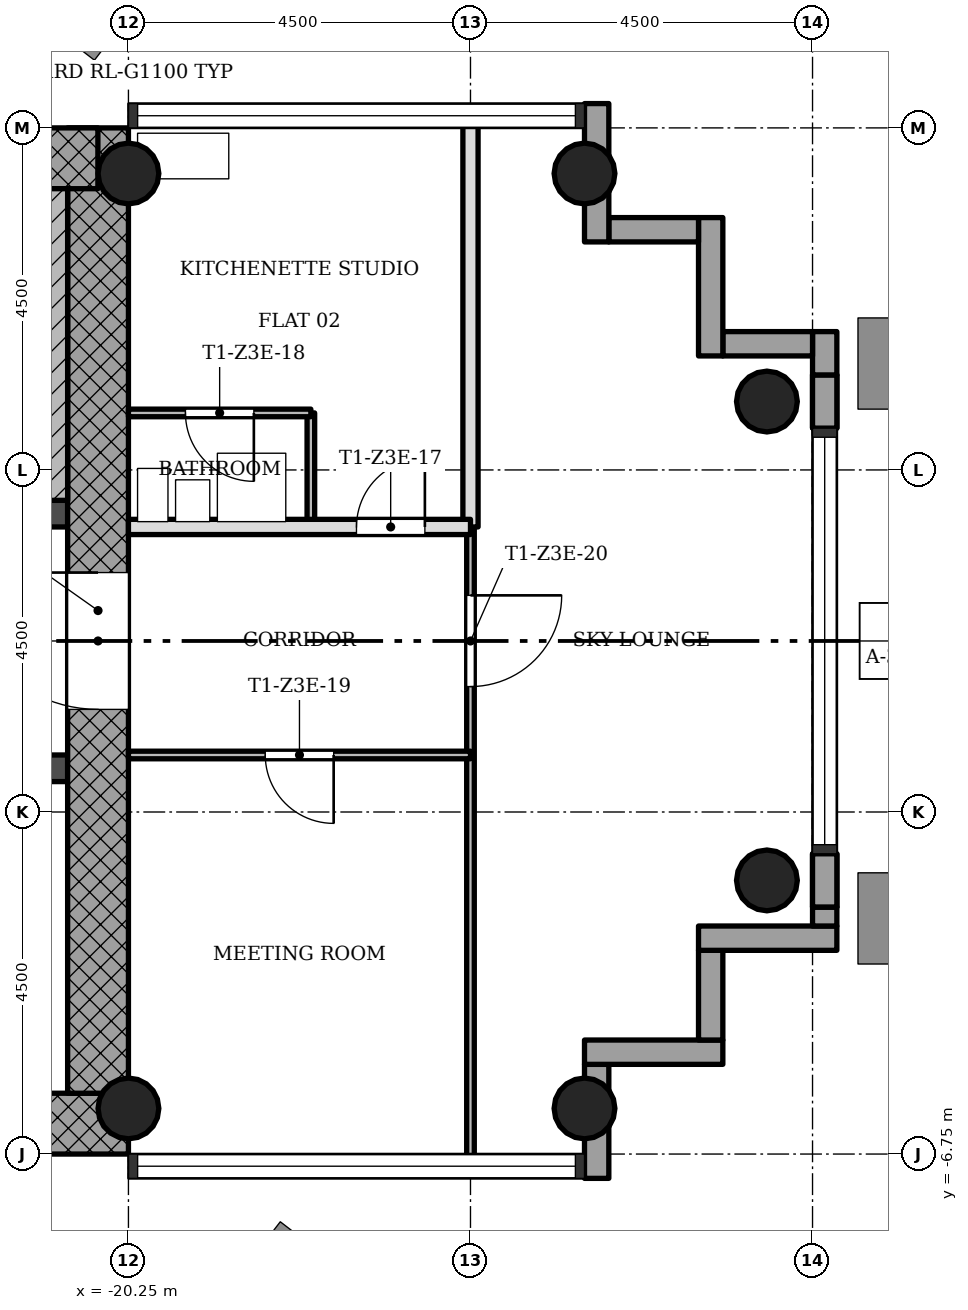
"""IFC4 building model, lengths in metres.
Left out: names, types, materials, properties, quantities, classifications, styles, units other than length and angle.
Written with IfcOpenShell. Run it as: python <this file> out.ifc"""

import sys

from ifc_helpers import new_model, si_unit, direction, frame, frame_2d, origin, origin_2d, place, context, subcontext, project, spatial, rectangle, hollow_circle, extrude, element, fill, save


model = new_model("IFC4")
c1 = context("Model", 3, precision=1e-05, world=origin(), true_north=direction((0.0, 1.0)))
c2 = subcontext(c1, "Body", "Model", "MODEL_VIEW")
j1 = project(units=[si_unit("LENGTHUNIT", "METRE"), si_unit("PLANEANGLEUNIT", "RADIAN")], contexts=[c1])
p1 = place(None, origin())
s1 = spatial("IfcSite", under=j1, at=p1, CompositionType="ELEMENT")
p2 = place(p1, origin())
s2 = spatial("IfcBuilding", under=s1, at=p2, CompositionType="ELEMENT")
p3 = place(p2, frame((0.0, 0.0, 177.9)))
s3 = spatial("IfcBuildingStorey", under=s2, at=p3, CompositionType="ELEMENT", Elevation=177.9)
p4 = place(p3, frame((-28.45, -6.35, 0.0), z_axis=(0.0, 0.0, 1.0), x_axis=(1.0, 0.0, 0.0)))
e1 = element("IfcWall", 1, at=p4, inside=s3, PredefinedType="SHEAR", context=c2, shape_type="SweptSolid", body=[
    extrude(rectangle(XDim=8.2, YDim=0.8, at=frame_2d((4.1, 0.0))), origin(), (0.0, 0.0, 1.0), 3.4),
])
p5 = place(p3, frame((-20.65, -5.95, 0.0), z_axis=(0.0, 0.0, 1.0), x_axis=(0.0, 1.0, 0.0)))
e2 = element("IfcWall", 2, at=p5, inside=s3, PredefinedType="SHEAR", context=c2, shape_type="SweptSolid", body=[
    extrude(rectangle(XDim=12.7, YDim=0.8, at=frame_2d((6.35, 0.0))), origin(), (0.0, 0.0, 1.0), 3.4),
])
p6 = place(p5, frame((5.05, 0.0, 0.0)))
e3 = element("IfcOpeningElement", 3, at=p6, cuts=e2, PredefinedType="OPENING", context=c2, shape_type="SweptSolid", body=[
    extrude(rectangle(XDim=1.8, YDim=2.1, at=frame_2d((0.9, 1.05))), frame((0.0, 0.41, 0.0), z_axis=(0.0, -1.0, 0.0), x_axis=(1.0, 0.0, 0.0)), (0.0, 0.0, 1.0), 0.82),
])
p7 = place(p3, frame((-20.652, 6.35, 0.0), z_axis=(0.0, 0.0, 1.0), x_axis=(-1.0, 0.0, 0.0)))
e4 = element("IfcWall", 4, at=p7, inside=s3, PredefinedType="SHEAR", context=c2, shape_type="SweptSolid", body=[
    extrude(rectangle(XDim=8.796, YDim=0.8, at=frame_2d((4.398, 0.0))), origin(), (0.0, 0.0, 1.0), 3.4),
])
p8 = place(p3, frame((-28.45, -1.675, 0.0), z_axis=(0.0, 0.0, 1.0), x_axis=(1.0, 0.0, 0.0)))
e5 = element("IfcWall", 5, at=p8, inside=s3, PredefinedType="SHEAR", context=c2, shape_type="SweptSolid", body=[
    extrude(rectangle(XDim=7.4, YDim=0.35, at=frame_2d((3.7, 0.0))), origin(), (0.0, 0.0, 1.0), 3.4),
])
p9 = place(p8, frame((0.95, 0.0, 0.0)))
e6 = element("IfcOpeningElement", 6, at=p9, cuts=e5, PredefinedType="OPENING", context=c2, shape_type="SweptSolid", body=[
    extrude(rectangle(XDim=1.1, YDim=2.1, at=frame_2d((0.55, 1.05))), frame((0.0, 0.185, 0.0), z_axis=(0.0, -1.0, 0.0), x_axis=(1.0, 0.0, 0.0)), (0.0, 0.0, 1.0), 0.37),
])
p10 = place(p8, frame((3.15, 0.0, 0.0)))
e7 = element("IfcOpeningElement", 7, at=p10, cuts=e5, PredefinedType="OPENING", context=c2, shape_type="SweptSolid", body=[
    extrude(rectangle(XDim=1.1, YDim=2.1, at=frame_2d((0.55, 1.05))), frame((0.0, 0.185, 0.0), z_axis=(0.0, -1.0, 0.0), x_axis=(1.0, 0.0, 0.0)), (0.0, 0.0, 1.0), 0.37),
])
p11 = place(p8, frame((5.35, 0.0, 0.0)))
e8 = element("IfcOpeningElement", 8, at=p11, cuts=e5, PredefinedType="OPENING", context=c2, shape_type="SweptSolid", body=[
    extrude(rectangle(XDim=1.1, YDim=2.1, at=frame_2d((0.55, 1.05))), frame((0.0, 0.185, 0.0), z_axis=(0.0, -1.0, 0.0), x_axis=(1.0, 0.0, 0.0)), (0.0, 0.0, 1.0), 0.37),
])
p12 = place(p3, frame((-28.45, 1.675, 0.0), z_axis=(0.0, 0.0, 1.0), x_axis=(1.0, 0.0, 0.0)))
e9 = element("IfcWall", 9, at=p12, inside=s3, PredefinedType="SHEAR", context=c2, shape_type="SweptSolid", body=[
    extrude(rectangle(XDim=7.4, YDim=0.35, at=frame_2d((3.7, 0.0))), origin(), (0.0, 0.0, 1.0), 3.4),
])
p13 = place(p12, frame((0.85, 0.0, 0.0)))
e10 = element("IfcOpeningElement", 10, at=p13, cuts=e9, PredefinedType="OPENING", context=c2, shape_type="SweptSolid", body=[
    extrude(rectangle(XDim=0.9, YDim=2.1, at=frame_2d((0.45, 1.05))), frame((0.0, 0.185, 0.0), z_axis=(0.0, -1.0, 0.0), x_axis=(1.0, 0.0, 0.0)), (0.0, 0.0, 1.0), 0.37),
])
for number, where, z_axis, x_axis in (
    (11, (-20.25, -6.15, 0.0), (0.0, 0.0, 1.0), (1.0, 0.0, 0.0)),
    (12, (-20.25, 6.15, 0.0), (0.0, 0.0, 1.0), (1.0, 0.0, 0.0)),
    (13, (-14.25, -6.15, 0.0), (0.0, 0.0, 1.0), (1.0, 0.0, 0.0)),
    (14, (-14.25, 6.15, 0.0), (0.0, 0.0, 1.0), (1.0, 0.0, 0.0)),
    (15, (-11.85, -3.15, 0.0), (0.0, 0.0, 1.0), (1.0, 0.0, 0.0)),
    (16, (-11.85, 3.15, 0.0), (0.0, 0.0, 1.0), (1.0, 0.0, 0.0)),
):
    element("IfcColumn", number, at=place(p3, frame(where, z_axis=z_axis, x_axis=x_axis)), inside=s3, PredefinedType="COLUMN", context=c2, shape_type="SweptSolid", body=[
        extrude(hollow_circle(Radius=0.4, WallThickness=0.028, at=origin_2d()), origin(), (0.0, 0.0, 1.0), 3.4),
    ])
p14 = place(p3, frame((-14.09, -7.07, -0.3), z_axis=(0.0, 0.0, 1.0), x_axis=(0.0, 1.0, 0.0)))
e17 = element("IfcWall", 17, at=p14, inside=s3, PredefinedType="STANDARD", context=c2, shape_type="SweptSolid", body=[
    extrude(rectangle(XDim=1.5, YDim=0.32, at=frame_2d((0.75, 0.0))), origin(), (0.0, 0.0, 1.0), 3.4),
])
p15 = place(p3, frame((-14.25, -5.41, -0.3), z_axis=(0.0, 0.0, 1.0), x_axis=(1.0, 0.0, 0.0)))
e18 = element("IfcWall", 18, at=p15, inside=s3, PredefinedType="STANDARD", context=c2, shape_type="SweptSolid", body=[
    extrude(rectangle(XDim=1.82, YDim=0.32, at=frame_2d((0.91, 0.0))), origin(), (0.0, 0.0, 1.0), 3.4),
])
p16 = place(p3, frame((-12.59, -5.25, -0.3), z_axis=(0.0, 0.0, 1.0), x_axis=(0.0, 1.0, 0.0)))
e19 = element("IfcWall", 19, at=p16, inside=s3, PredefinedType="STANDARD", context=c2, shape_type="SweptSolid", body=[
    extrude(rectangle(XDim=1.18, YDim=0.32, at=frame_2d((0.59, 0.0))), origin(), (0.0, 0.0, 1.0), 3.4),
])
p17 = place(p3, frame((-12.75, -3.91, -0.3), z_axis=(0.0, 0.0, 1.0), x_axis=(1.0, 0.0, 0.0)))
e20 = element("IfcWall", 20, at=p17, inside=s3, PredefinedType="STANDARD", context=c2, shape_type="SweptSolid", body=[
    extrude(rectangle(XDim=1.82, YDim=0.32, at=frame_2d((0.91, 0.0))), origin(), (0.0, 0.0, 1.0), 3.4),
])
p18 = place(p3, frame((-11.09, -3.75, 0.0), z_axis=(0.0, 0.0, 1.0), x_axis=(0.0, 1.0, 0.0)))
e21 = element("IfcWall", 21, at=p18, inside=s3, PredefinedType="STANDARD", context=c2, shape_type="SweptSolid", body=[
    extrude(rectangle(XDim=0.25, YDim=0.32, at=frame_2d((0.125, 0.0))), origin(), (0.0, 0.0, 1.0), 3.1),
])
p19 = place(p3, frame((-11.09, -3.5, 0.0), z_axis=(0.0, 0.0, 1.0), x_axis=(0.0, 1.0, 0.0)))
e22 = element("IfcWall", 22, at=p19, inside=s3, PredefinedType="STANDARD", context=c2, shape_type="SweptSolid", body=[
    extrude(rectangle(XDim=0.7, YDim=0.32, at=frame_2d((0.35, 0.0))), origin(), (0.0, 0.0, 1.0), 2.51),
])
p20 = place(p3, frame((-11.09, -3.5, 2.98), z_axis=(0.0, 0.0, 1.0), x_axis=(0.0, 1.0, 0.0)))
e23 = element("IfcWall", 23, at=p20, inside=s3, PredefinedType="STANDARD", context=c2, shape_type="SweptSolid", body=[
    extrude(rectangle(XDim=0.7, YDim=0.32, at=frame_2d((0.35, 0.0))), origin(), (0.0, 0.0, 1.0), 0.12),
])
p21 = place(p3, frame((-11.09, 2.8, 0.0), z_axis=(0.0, 0.0, 1.0), x_axis=(0.0, 1.0, 0.0)))
e24 = element("IfcWall", 24, at=p21, inside=s3, PredefinedType="STANDARD", context=c2, shape_type="SweptSolid", body=[
    extrude(rectangle(XDim=0.7, YDim=0.32, at=frame_2d((0.35, 0.0))), origin(), (0.0, 0.0, 1.0), 2.51),
])
p22 = place(p3, frame((-11.09, 2.8, 2.98), z_axis=(0.0, 0.0, 1.0), x_axis=(0.0, 1.0, 0.0)))
e25 = element("IfcWall", 25, at=p22, inside=s3, PredefinedType="STANDARD", context=c2, shape_type="SweptSolid", body=[
    extrude(rectangle(XDim=0.7, YDim=0.32, at=frame_2d((0.35, 0.0))), origin(), (0.0, 0.0, 1.0), 0.12),
])
p23 = place(p3, frame((-11.09, 3.5, 0.0), z_axis=(0.0, 0.0, 1.0), x_axis=(0.0, 1.0, 0.0)))
e26 = element("IfcWall", 26, at=p23, inside=s3, PredefinedType="STANDARD", context=c2, shape_type="SweptSolid", body=[
    extrude(rectangle(XDim=0.57, YDim=0.32, at=frame_2d((0.285, 0.0))), origin(), (0.0, 0.0, 1.0), 3.1),
])
p24 = place(p3, frame((-11.25, 3.91, -0.3), z_axis=(0.0, 0.0, 1.0), x_axis=(-1.0, 0.0, 0.0)))
e27 = element("IfcWall", 27, at=p24, inside=s3, PredefinedType="STANDARD", context=c2, shape_type="SweptSolid", body=[
    extrude(rectangle(XDim=1.18, YDim=0.32, at=frame_2d((0.59, 0.0))), origin(), (0.0, 0.0, 1.0), 3.4),
])
p25 = place(p3, frame((-12.59, 3.75, -0.3), z_axis=(0.0, 0.0, 1.0), x_axis=(0.0, 1.0, 0.0)))
e28 = element("IfcWall", 28, at=p25, inside=s3, PredefinedType="STANDARD", context=c2, shape_type="SweptSolid", body=[
    extrude(rectangle(XDim=1.82, YDim=0.32, at=frame_2d((0.91, 0.0))), origin(), (0.0, 0.0, 1.0), 3.4),
])
p26 = place(p3, frame((-12.75, 5.41, -0.3), z_axis=(0.0, 0.0, 1.0), x_axis=(-1.0, 0.0, 0.0)))
e29 = element("IfcWall", 29, at=p26, inside=s3, PredefinedType="STANDARD", context=c2, shape_type="SweptSolid", body=[
    extrude(rectangle(XDim=1.18, YDim=0.32, at=frame_2d((0.59, 0.0))), origin(), (0.0, 0.0, 1.0), 3.4),
])
p27 = place(p3, frame((-14.09, 5.25, -0.3), z_axis=(0.0, 0.0, 1.0), x_axis=(0.0, 1.0, 0.0)))
e30 = element("IfcWall", 30, at=p27, inside=s3, PredefinedType="STANDARD", context=c2, shape_type="SweptSolid", body=[
    extrude(rectangle(XDim=1.82, YDim=0.32, at=frame_2d((0.91, 0.0))), origin(), (0.0, 0.0, 1.0), 3.4),
])
p28 = place(p3, frame((-17.85, 1.5, 0.0), z_axis=(0.0, 0.0, 1.0), x_axis=(0.0, 1.0, 0.0)))
e31 = element("IfcWall", 31, at=p28, inside=s3, PredefinedType="PARTITIONING", context=c2, shape_type="SweptSolid", body=[
    extrude(rectangle(XDim=1.5, YDim=0.1, at=frame_2d((0.75, 0.0))), origin(), (0.0, 0.0, 1.0), 3.0),
])
p29 = place(p3, frame((-15.75, -6.85, 0.0), z_axis=(0.0, 0.0, 1.0), x_axis=(0.0, 1.0, 0.0)))
e32 = element("IfcWall", 32, at=p29, inside=s3, PredefinedType="PARTITIONING", context=c2, shape_type="SweptSolid", body=[
    extrude(rectangle(XDim=8.35, YDim=0.1, at=frame_2d((4.175, 0.0))), origin(), (0.0, 0.0, 1.0), 3.0),
])
p30 = place(p29, frame((6.25, 0.0, 0.0)))
e33 = element("IfcOpeningElement", 33, at=p30, cuts=e32, PredefinedType="OPENING", context=c2, shape_type="SweptSolid", body=[
    extrude(rectangle(XDim=1.2, YDim=2.1, at=frame_2d((0.6, 1.05))), frame((0.0, 0.06, 0.0), z_axis=(0.0, -1.0, 0.0), x_axis=(1.0, 0.0, 0.0)), (0.0, 0.0, 1.0), 0.12),
])
p31 = place(p3, frame((-15.75, 1.5, 0.0), z_axis=(0.0, 0.0, 1.0), x_axis=(0.0, 1.0, 0.0)))
e34 = element("IfcWall", 34, at=p31, inside=s3, PredefinedType="SOLIDWALL", context=c2, shape_type="SweptSolid", body=[
    extrude(rectangle(XDim=5.35, YDim=0.2, at=frame_2d((2.675, 0.0))), origin(), (0.0, 0.0, 1.0), 3.0),
])
p32 = place(p3, frame((-20.25, -1.5, 0.0), z_axis=(0.0, 0.0, 1.0), x_axis=(1.0, 0.0, 0.0)))
e35 = element("IfcWall", 35, at=p32, inside=s3, PredefinedType="PARTITIONING", context=c2, shape_type="SweptSolid", body=[
    extrude(rectangle(XDim=4.5, YDim=0.1, at=frame_2d((2.25, 0.0))), origin(), (0.0, 0.0, 1.0), 3.0),
])
p33 = place(p32, frame((1.8, 0.0, 0.0)))
e36 = element("IfcOpeningElement", 36, at=p33, cuts=e35, PredefinedType="OPENING", context=c2, shape_type="SweptSolid", body=[
    extrude(rectangle(XDim=0.9, YDim=2.1, at=frame_2d((0.45, 1.05))), frame((0.0, 0.06, 0.0), z_axis=(0.0, -1.0, 0.0), x_axis=(1.0, 0.0, 0.0)), (0.0, 0.0, 1.0), 0.12),
])
p34 = place(p3, frame((-20.25, 1.5, 0.0), z_axis=(0.0, 0.0, 1.0), x_axis=(1.0, 0.0, 0.0)))
e37 = element("IfcWall", 37, at=p34, inside=s3, PredefinedType="SOLIDWALL", context=c2, shape_type="SweptSolid", body=[
    extrude(rectangle(XDim=4.5, YDim=0.2, at=frame_2d((2.25, 0.0))), origin(), (0.0, 0.0, 1.0), 3.0),
])
p35 = place(p34, frame((3.0, 0.0, 0.0)))
e38 = element("IfcOpeningElement", 38, at=p35, cuts=e37, PredefinedType="OPENING", context=c2, shape_type="SweptSolid", body=[
    extrude(rectangle(XDim=0.9, YDim=2.1, at=frame_2d((0.45, 1.05))), frame((0.0, 0.11, 0.0), z_axis=(0.0, -1.0, 0.0), x_axis=(1.0, 0.0, 0.0)), (0.0, 0.0, 1.0), 0.22),
])
p36 = place(p3, frame((-20.25, 3.0, 0.0), z_axis=(0.0, 0.0, 1.0), x_axis=(1.0, 0.0, 0.0)))
e39 = element("IfcWall", 39, at=p36, inside=s3, PredefinedType="PARTITIONING", context=c2, shape_type="SweptSolid", body=[
    extrude(rectangle(XDim=2.4, YDim=0.1, at=frame_2d((1.2, 0.0))), origin(), (0.0, 0.0, 1.0), 3.0),
])
p37 = place(p36, frame((0.75, 0.0, 0.0)))
e40 = element("IfcOpeningElement", 40, at=p37, cuts=e39, PredefinedType="OPENING", context=c2, shape_type="SweptSolid", body=[
    extrude(rectangle(XDim=0.9, YDim=2.1, at=frame_2d((0.45, 1.05))), frame((0.0, 0.06, 0.0), z_axis=(0.0, -1.0, 0.0), x_axis=(1.0, 0.0, 0.0)), (0.0, 0.0, 1.0), 0.12),
])
p38 = place(p3, frame((-21.25, 1.85, 0.0), z_axis=(0.0, 0.0, 1.0), x_axis=(0.0, 1.0, 0.0)))
e41 = element("IfcWall", 41, at=p38, inside=s3, PredefinedType="SHEAR", context=c2, shape_type="SweptSolid", body=[
    extrude(rectangle(XDim=4.1, YDim=0.4, at=frame_2d((2.05, 0.0))), origin(), (0.0, 0.0, 1.0), 3.4),
])
p39 = place(p35, origin())
e42 = element("IfcDoor", 42, at=p39, inside=s3, OperationType="SINGLE_SWING_LEFT", PredefinedType="DOOR", context=c2, shape_type="SweptSolid", body=[
    extrude(rectangle(XDim=0.9, YDim=2.1, at=frame_2d((0.45, 1.05))), frame((0.0, 0.025, 0.0), z_axis=(0.0, -1.0, 0.0), x_axis=(1.0, 0.0, 0.0)), (0.0, 0.0, 1.0), 0.05),
])
fill(e38, e42)
p40 = place(p37, origin())
e43 = element("IfcDoor", 43, at=p40, inside=s3, OperationType="SINGLE_SWING_RIGHT", PredefinedType="DOOR", context=c2, shape_type="SweptSolid", body=[
    extrude(rectangle(XDim=0.9, YDim=2.1, at=frame_2d((0.45, 1.05))), frame((0.0, 0.025, 0.0), z_axis=(0.0, -1.0, 0.0), x_axis=(1.0, 0.0, 0.0)), (0.0, 0.0, 1.0), 0.05),
])
fill(e40, e43)
p41 = place(p33, origin())
e44 = element("IfcDoor", 44, at=p41, inside=s3, OperationType="SINGLE_SWING_RIGHT", PredefinedType="DOOR", context=c2, shape_type="SweptSolid", body=[
    extrude(rectangle(XDim=0.9, YDim=2.1, at=frame_2d((0.45, 1.05))), frame((0.0, 0.025, 0.0), z_axis=(0.0, -1.0, 0.0), x_axis=(1.0, 0.0, 0.0)), (0.0, 0.0, 1.0), 0.05),
])
fill(e36, e44)
p42 = place(p30, origin())
e45 = element("IfcDoor", 45, at=p42, inside=s3, OperationType="SINGLE_SWING_RIGHT", PredefinedType="DOOR", context=c2, shape_type="SweptSolid", body=[
    extrude(rectangle(XDim=1.2, YDim=2.1, at=frame_2d((0.6, 1.05))), frame((0.0, 0.025, 0.0), z_axis=(0.0, -1.0, 0.0), x_axis=(1.0, 0.0, 0.0)), (0.0, 0.0, 1.0), 0.05),
])
fill(e33, e45)
p43 = place(p6, origin())
e46 = element("IfcDoor", 46, at=p43, inside=s3, OperationType="SINGLE_SWING_LEFT", PredefinedType="DOOR", context=c2, shape_type="SweptSolid", body=[
    extrude(rectangle(XDim=1.8, YDim=2.1, at=frame_2d((0.9, 1.05))), frame((0.0, 0.025, 0.0), z_axis=(0.0, -1.0, 0.0), x_axis=(1.0, 0.0, 0.0)), (0.0, 0.0, 1.0), 0.05),
])
fill(e3, e46)
save(model, sys.argv[1])
